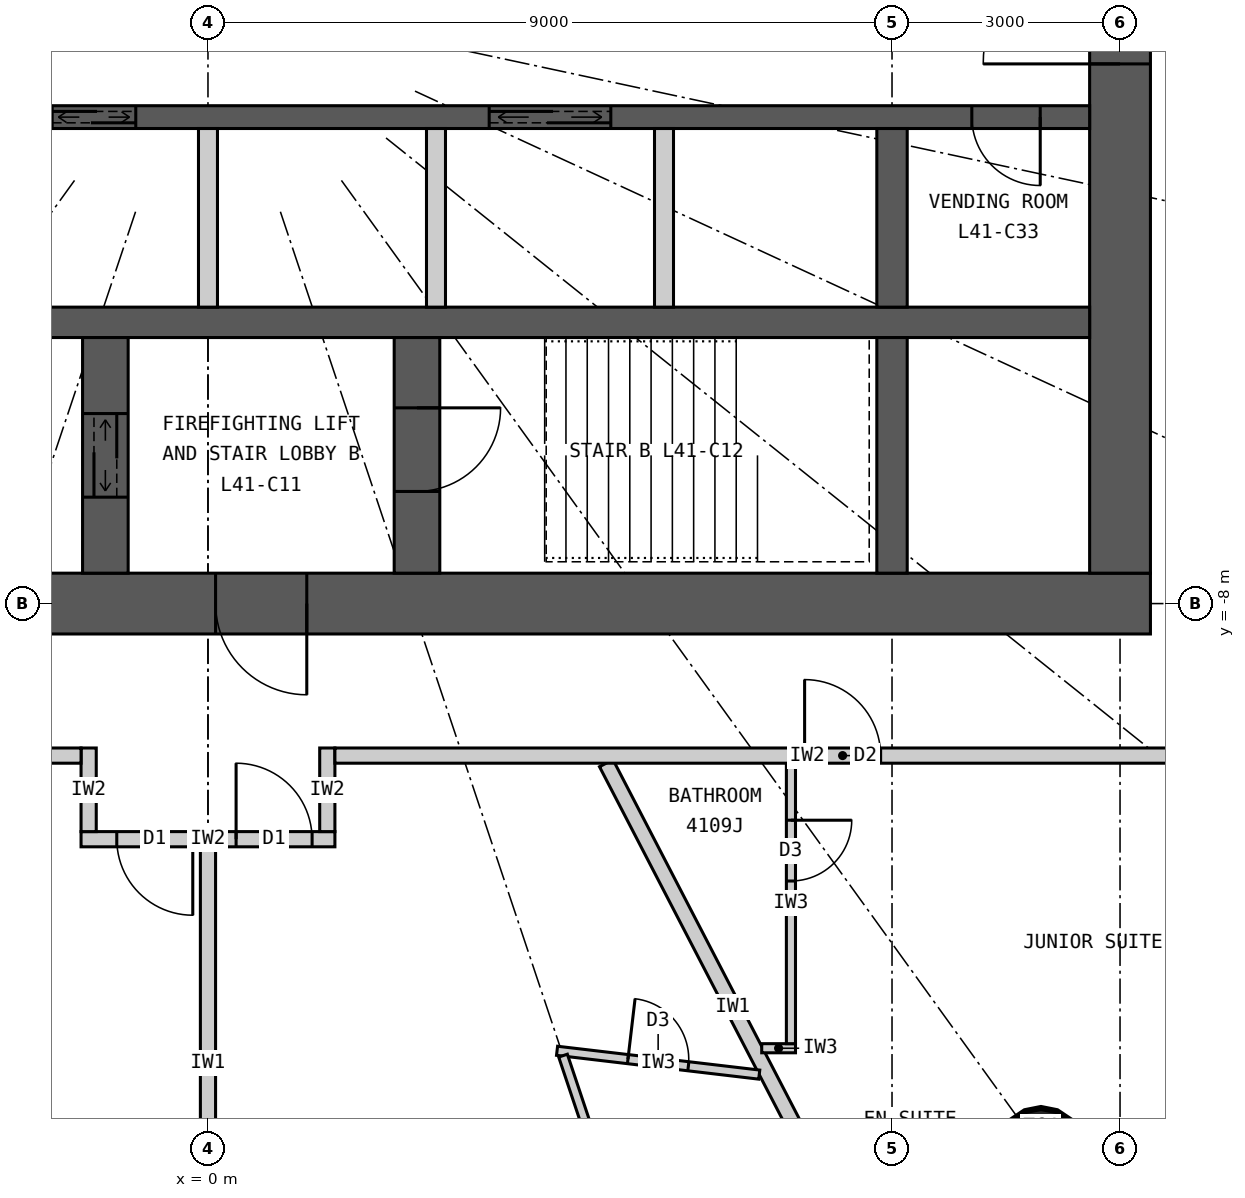
"""IFC4 building model, lengths in metres.
Left out: names, types, materials, properties, quantities, classifications, styles, units other than length and angle.
Written with IfcOpenShell. Run it as: python <this file> out.ifc"""

import sys

from ifc_helpers import new_model, si_unit, direction, frame, frame_2d, origin, origin_2d, place, context, subcontext, project, spatial, rectangle, circle, extrude, element, fill, save


model = new_model("IFC4")
c1 = context("Model", 3, precision=1e-05, world=origin(), true_north=direction((0.0, 1.0)))
c2 = subcontext(c1, "Body", "Model", "MODEL_VIEW")
j1 = project(units=[si_unit("LENGTHUNIT", "METRE"), si_unit("PLANEANGLEUNIT", "RADIAN")], contexts=[c1])
p1 = place(None, origin())
s1 = spatial("IfcSite", under=j1, at=p1, CompositionType="ELEMENT")
p2 = place(p1, origin())
s2 = spatial("IfcBuilding", under=s1, at=p2, CompositionType="ELEMENT")
p3 = place(p2, frame((0.0, 0.0, 156.6)))
s3 = spatial("IfcBuildingStorey", under=s2, at=p3, CompositionType="ELEMENT", Elevation=156.6)
p4 = place(p3, frame((10.96, -15.186, 0.0), z_axis=(0.0, 0.0, 1.0), x_axis=(1.0, 0.0, 0.0)))
e1 = element("IfcColumn", 1, at=p4, inside=s3, PredefinedType="COLUMN", context=c2, shape_type="SweptSolid", body=[
    extrude(circle(Radius=0.55, at=origin_2d()), origin(), (0.0, 0.0, 1.0), 3.3),
])
p5 = place(p3, frame((12.4, -8.0, 0.0), z_axis=(0.0, 0.0, 1.0), x_axis=(-1.0, 0.0, 0.0)))
e2 = element("IfcWall", 2, at=p5, inside=s3, PredefinedType="SHEAR", context=c2, shape_type="SweptSolid", body=[
    extrude(rectangle(XDim=24.8, YDim=0.8, at=frame_2d((12.4, 0.0))), origin(), (0.0, 0.0, 1.0), 3.3),
])
p6 = place(p5, frame((11.1, 0.0, 0.0)))
e3 = element("IfcOpeningElement", 3, at=p6, cuts=e2, PredefinedType="OPENING", context=c2, shape_type="SweptSolid", body=[
    extrude(rectangle(XDim=1.2, YDim=2.2, at=frame_2d((0.6, 1.1))), frame((0.0, 0.41, 0.0), z_axis=(0.0, -1.0, 0.0), x_axis=(1.0, 0.0, 0.0)), (0.0, 0.0, 1.0), 0.82),
])
p7 = place(p5, frame((18.7, 0.0, 0.0)))
e4 = element("IfcOpeningElement", 4, at=p7, cuts=e2, PredefinedType="OPENING", context=c2, shape_type="SweptSolid", body=[
    extrude(rectangle(XDim=0.9, YDim=2.2, at=frame_2d((0.45, 1.1))), frame((0.0, 0.41, 0.0), z_axis=(0.0, -1.0, 0.0), x_axis=(1.0, 0.0, 0.0)), (0.0, 0.0, 1.0), 0.82),
])
p8 = place(p3, frame((12.0, -7.6, 0.0), z_axis=(0.0, 0.0, 1.0), x_axis=(0.0, 1.0, 0.0)))
e5 = element("IfcWall", 5, at=p8, inside=s3, PredefinedType="SHEAR", context=c2, shape_type="SweptSolid", body=[
    extrude(rectangle(XDim=15.2, YDim=0.8, at=frame_2d((7.6, 0.0))), origin(), (0.0, 0.0, 1.0), 3.3),
])
p9 = place(p8, frame((6.7, 0.0, 0.0)))
e6 = element("IfcOpeningElement", 6, at=p9, cuts=e5, PredefinedType="OPENING", context=c2, shape_type="SweptSolid", body=[
    extrude(rectangle(XDim=1.8, YDim=2.2, at=frame_2d((0.9, 1.1))), frame((0.0, 0.41, 0.0), z_axis=(0.0, -1.0, 0.0), x_axis=(1.0, 0.0, 0.0)), (0.0, 0.0, 1.0), 0.82),
])
p10 = place(p3, frame((-11.6, -4.3, 0.0), z_axis=(0.0, 0.0, 1.0), x_axis=(1.0, 0.0, 0.0)))
e7 = element("IfcWall", 7, at=p10, inside=s3, PredefinedType="SHEAR", context=c2, shape_type="SweptSolid", body=[
    extrude(rectangle(XDim=23.2, YDim=0.4, at=frame_2d((11.6, 0.0))), origin(), (0.0, 0.0, 1.0), 3.3),
])
p11 = place(p3, frame((-11.6, -1.6, 0.0), z_axis=(0.0, 0.0, 1.0), x_axis=(1.0, 0.0, 0.0)))
e8 = element("IfcWall", 8, at=p11, inside=s3, PredefinedType="SHEAR", context=c2, shape_type="SweptSolid", body=[
    extrude(rectangle(XDim=23.2, YDim=0.3, at=frame_2d((11.6, 0.0))), origin(), (0.0, 0.0, 1.0), 3.3),
])
p12 = place(p11, frame((9.55, 0.0, 0.0)))
e9 = element("IfcOpeningElement", 9, at=p12, cuts=e8, PredefinedType="OPENING", context=c2, shape_type="SweptSolid", body=[
    extrude(rectangle(XDim=1.1, YDim=2.2, at=frame_2d((0.55, 1.1))), frame((0.0, 0.16, 0.0), z_axis=(0.0, -1.0, 0.0), x_axis=(1.0, 0.0, 0.0)), (0.0, 0.0, 1.0), 0.32),
])
p13 = place(p11, frame((15.3, 0.0, 0.0)))
e10 = element("IfcOpeningElement", 10, at=p13, cuts=e8, PredefinedType="OPENING", context=c2, shape_type="SweptSolid", body=[
    extrude(rectangle(XDim=1.6, YDim=2.4, at=frame_2d((0.8, 1.2))), frame((0.0, 0.16, 0.0), z_axis=(0.0, -1.0, 0.0), x_axis=(1.0, 0.0, 0.0)), (0.0, 0.0, 1.0), 0.32),
])
p14 = place(p11, frame((0.65, 0.0, 0.0)))
e11 = element("IfcOpeningElement", 11, at=p14, cuts=e8, PredefinedType="OPENING", context=c2, shape_type="SweptSolid", body=[
    extrude(rectangle(XDim=0.9, YDim=2.2, at=frame_2d((0.45, 1.1))), frame((0.0, 0.16, 0.0), z_axis=(0.0, -1.0, 0.0), x_axis=(1.0, 0.0, 0.0)), (0.0, 0.0, 1.0), 0.32),
])
p15 = place(p11, frame((5.15, 0.0, 0.0)))
e12 = element("IfcOpeningElement", 12, at=p15, cuts=e8, PredefinedType="OPENING", context=c2, shape_type="SweptSolid", body=[
    extrude(rectangle(XDim=0.9, YDim=2.2, at=frame_2d((0.45, 1.1))), frame((0.0, 0.16, 0.0), z_axis=(0.0, -1.0, 0.0), x_axis=(1.0, 0.0, 0.0)), (0.0, 0.0, 1.0), 0.32),
])
p16 = place(p11, frame((21.65, 0.0, 0.0)))
e13 = element("IfcOpeningElement", 13, at=p16, cuts=e8, PredefinedType="OPENING", context=c2, shape_type="SweptSolid", body=[
    extrude(rectangle(XDim=0.9, YDim=2.2, at=frame_2d((0.45, 1.1))), frame((0.0, 0.16, 0.0), z_axis=(0.0, -1.0, 0.0), x_axis=(1.0, 0.0, 0.0)), (0.0, 0.0, 1.0), 0.32),
])
p17 = place(p3, frame((9.0, -4.1, 0.0), z_axis=(0.0, 0.0, 1.0), x_axis=(0.0, 1.0, 0.0)))
e14 = element("IfcWall", 14, at=p17, inside=s3, PredefinedType="SHEAR", context=c2, shape_type="SweptSolid", body=[
    extrude(rectangle(XDim=2.35, YDim=0.4, at=frame_2d((1.175, 0.0))), origin(), (0.0, 0.0, 1.0), 3.3),
])
p18 = place(p3, frame((9.0, -7.6, 0.0), z_axis=(0.0, 0.0, 1.0), x_axis=(0.0, 1.0, 0.0)))
e15 = element("IfcWall", 15, at=p18, inside=s3, PredefinedType="SHEAR", context=c2, shape_type="SweptSolid", body=[
    extrude(rectangle(XDim=3.1, YDim=0.4, at=frame_2d((1.55, 0.0))), origin(), (0.0, 0.0, 1.0), 3.3),
])
p19 = place(p3, frame((2.75, -7.6, 0.0), z_axis=(0.0, 0.0, 1.0), x_axis=(0.0, 1.0, 0.0)))
e16 = element("IfcWall", 16, at=p19, inside=s3, PredefinedType="SHEAR", context=c2, shape_type="SweptSolid", body=[
    extrude(rectangle(XDim=3.1, YDim=0.6, at=frame_2d((1.55, 0.0))), origin(), (0.0, 0.0, 1.0), 3.3),
])
p20 = place(p19, frame((1.075, 0.0, 0.0)))
e17 = element("IfcOpeningElement", 17, at=p20, cuts=e16, PredefinedType="OPENING", context=c2, shape_type="SweptSolid", body=[
    extrude(rectangle(XDim=1.1, YDim=2.2, at=frame_2d((0.55, 1.1))), frame((0.0, 0.31, 0.0), z_axis=(0.0, -1.0, 0.0), x_axis=(1.0, 0.0, 0.0)), (0.0, 0.0, 1.0), 0.62),
])
p21 = place(p3, frame((-1.35, -7.6, 0.0), z_axis=(0.0, 0.0, 1.0), x_axis=(0.0, 1.0, 0.0)))
e18 = element("IfcWall", 18, at=p21, inside=s3, PredefinedType="SHEAR", context=c2, shape_type="SweptSolid", body=[
    extrude(rectangle(XDim=3.1, YDim=0.6, at=frame_2d((1.55, 0.0))), origin(), (0.0, 0.0, 1.0), 3.3),
])
p22 = place(p21, frame((1.0, 0.0, 0.0)))
e19 = element("IfcOpeningElement", 19, at=p22, cuts=e18, PredefinedType="OPENING", context=c2, shape_type="SweptSolid", body=[
    extrude(rectangle(XDim=1.1, YDim=2.2, at=frame_2d((0.55, 1.1))), frame((0.0, 0.31, 0.0), z_axis=(0.0, -1.0, 0.0), x_axis=(1.0, 0.0, 0.0)), (0.0, 0.0, 1.0), 0.62),
])
for number, where, z_axis, x_axis in (
    (20, (0.0, -4.1, 0.0), (0.0, 0.0, 1.0), (0.0, 1.0, 0.0)),
    (21, (3.0, -4.1, 0.0), (0.0, 0.0, 1.0), (0.0, 1.0, 0.0)),
    (22, (6.0, -4.1, 0.0), (0.0, 0.0, 1.0), (0.0, 1.0, 0.0)),
):
    element("IfcWall", number, at=place(p3, frame(where, z_axis=z_axis, x_axis=x_axis)), inside=s3, PredefinedType="PARTITIONING", context=c2, shape_type="SweptSolid", body=[
        extrude(rectangle(XDim=2.35, YDim=0.25, at=frame_2d((1.175, 0.0))), origin(), (0.0, 0.0, 1.0), 3.3),
    ])
p23 = place(p3, frame((11.346, -15.722, 0.0), z_axis=(0.0, 0.0, 1.0), x_axis=(0.857695199231, 0.514158482587, 0.0)))
e23 = element("IfcWall", 23, at=p23, inside=s3, PredefinedType="ELEMENTEDWALL", context=c2, shape_type="SweptSolid", body=[
    extrude(rectangle(XDim=5.536, YDim=0.15, at=frame_2d((2.768, 0.0))), origin(), (0.0, 0.0, 1.0), 3.12),
])
p24 = place(p23, frame((1.068, 0.0, 0.9)))
e24 = element("IfcOpeningElement", 24, at=p24, cuts=e23, PredefinedType="OPENING", context=c2, shape_type="SweptSolid", body=[
    extrude(rectangle(XDim=1.4, YDim=1.9, at=frame_2d((0.7, 0.95))), frame((0.0, 0.085, 0.0), z_axis=(0.0, -1.0, 0.0), x_axis=(1.0, 0.0, 0.0)), (0.0, 0.0, 1.0), 0.17),
])
p25 = place(p23, frame((3.068, 0.0, 0.9)))
e25 = element("IfcOpeningElement", 25, at=p25, cuts=e23, PredefinedType="OPENING", context=c2, shape_type="SweptSolid", body=[
    extrude(rectangle(XDim=1.4, YDim=1.9, at=frame_2d((0.7, 0.95))), frame((0.0, 0.085, 0.0), z_axis=(0.0, -1.0, 0.0), x_axis=(1.0, 0.0, 0.0)), (0.0, 0.0, 1.0), 0.17),
])
p26 = place(p3, frame((0.0, -11.2, 0.0), z_axis=(0.0, 0.0, 1.0), x_axis=(0.0, -1.0, 0.0)))
e26 = element("IfcWall", 26, at=p26, inside=s3, PredefinedType="PARTITIONING", context=c2, shape_type="SweptSolid", body=[
    extrude(rectangle(XDim=5.7, YDim=0.2, at=frame_2d((2.85, 0.0))), origin(), (0.0, 0.0, 1.0), 2.42),
])
p27 = place(p3, frame((5.24, -10.1, 0.0), z_axis=(0.0, 0.0, 1.0), x_axis=(0.460532965373, -0.887642601391, 0.0)))
e27 = element("IfcWall", 27, at=p27, inside=s3, PredefinedType="PARTITIONING", context=c2, shape_type="SweptSolid", body=[
    extrude(rectangle(XDim=7.231, YDim=0.2, at=frame_2d((3.616, 0.0))), origin(), (0.0, 0.0, 1.0), 3.12),
])
p28 = place(p3, frame((1.67, -11.1, 0.0), z_axis=(0.0, 0.0, 1.0), x_axis=(-1.0, 0.0, 0.0)))
e28 = element("IfcWall", 28, at=p28, inside=s3, PredefinedType="PARTITIONING", context=c2, shape_type="SweptSolid", body=[
    extrude(rectangle(XDim=3.34, YDim=0.2, at=frame_2d((1.67, 0.0))), origin(), (0.0, 0.0, 1.0), 3.12),
])
p29 = place(p28, frame((1.87, 0.0, 0.0)))
e29 = element("IfcOpeningElement", 29, at=p29, cuts=e28, PredefinedType="OPENING", context=c2, shape_type="SweptSolid", body=[
    extrude(rectangle(XDim=1.0, YDim=2.2, at=frame_2d((0.5, 1.1))), frame((0.0, 0.11, 0.0), z_axis=(0.0, -1.0, 0.0), x_axis=(1.0, 0.0, 0.0)), (0.0, 0.0, 1.0), 0.22),
])
p30 = place(p28, frame((0.3, 0.0, 0.0)))
e30 = element("IfcOpeningElement", 30, at=p30, cuts=e28, PredefinedType="OPENING", context=c2, shape_type="SweptSolid", body=[
    extrude(rectangle(XDim=1.0, YDim=2.2, at=frame_2d((0.5, 1.1))), frame((0.0, 0.11, 0.0), z_axis=(0.0, -1.0, 0.0), x_axis=(1.0, 0.0, 0.0)), (0.0, 0.0, 1.0), 0.22),
])
for number, where, z_axis, x_axis in (
    (31, (1.57, -9.9, 0.0), (0.0, 0.0, 1.0), (0.0, -1.0, 0.0)),
    (32, (-1.57, -9.9, 0.0), (0.0, 0.0, 1.0), (0.0, -1.0, 0.0)),
):
    element("IfcWall", number, at=place(p3, frame(where, z_axis=z_axis, x_axis=x_axis)), inside=s3, PredefinedType="PARTITIONING", context=c2, shape_type="SweptSolid", body=[
        extrude(rectangle(XDim=1.1, YDim=0.2, at=frame_2d((0.55, 0.0))), origin(), (0.0, 0.0, 1.0), 3.12),
    ])
p31 = place(p3, frame((7.253, -14.197, 0.0), z_axis=(0.0, 0.0, 1.0), x_axis=(-0.993128188393, 0.117031625725, 0.0)))
e33 = element("IfcWall", 33, at=p31, inside=s3, PredefinedType="PARTITIONING", context=c2, shape_type="SweptSolid", body=[
    extrude(rectangle(XDim=2.678, YDim=0.12, at=frame_2d((1.339, 0.0))), origin(), (0.0, 0.0, 1.0), 3.12),
])
p32 = place(p31, frame((0.939, 0.0, 0.0)))
e34 = element("IfcOpeningElement", 34, at=p32, cuts=e33, PredefinedType="OPENING", context=c2, shape_type="SweptSolid", body=[
    extrude(rectangle(XDim=0.8, YDim=2.1, at=frame_2d((0.4, 1.05))), frame((0.0, 0.07, 0.0), z_axis=(0.0, -1.0, 0.0), x_axis=(1.0, 0.0, 0.0)), (0.0, 0.0, 1.0), 0.14),
])
p33 = place(p3, frame((4.671, -13.948, 0.0), z_axis=(0.0, 0.0, 1.0), x_axis=(0.317669167093, -0.948201613729, 0.0)))
e35 = element("IfcWall", 35, at=p33, inside=s3, PredefinedType="PARTITIONING", context=c2, shape_type="SweptSolid", body=[
    extrude(rectangle(XDim=2.54, YDim=0.12, at=frame_2d((1.27, 0.0))), origin(), (0.0, 0.0, 1.0), 2.42),
])
p34 = place(p3, frame((7.286, -13.85, 0.0), z_axis=(0.0, 0.0, 1.0), x_axis=(1.0, 0.0, 0.0)))
e36 = element("IfcWall", 36, at=p34, inside=s3, PredefinedType="PARTITIONING", context=c2, shape_type="SweptSolid", body=[
    extrude(rectangle(XDim=0.444, YDim=0.12, at=frame_2d((0.222, 0.0))), origin(), (0.0, 0.0, 1.0), 3.12),
])
p35 = place(p3, frame((7.67, -10.1, 0.0), z_axis=(0.0, 0.0, 1.0), x_axis=(0.0, -1.0, 0.0)))
e37 = element("IfcWall", 37, at=p35, inside=s3, PredefinedType="PARTITIONING", context=c2, shape_type="SweptSolid", body=[
    extrude(rectangle(XDim=3.69, YDim=0.12, at=frame_2d((1.845, 0.0))), origin(), (0.0, 0.0, 1.0), 3.12),
])
p36 = place(p35, frame((0.75, 0.0, 0.0)))
e38 = element("IfcOpeningElement", 38, at=p36, cuts=e37, PredefinedType="OPENING", context=c2, shape_type="SweptSolid", body=[
    extrude(rectangle(XDim=0.8, YDim=2.1, at=frame_2d((0.4, 1.05))), frame((0.0, 0.07, 0.0), z_axis=(0.0, -1.0, 0.0), x_axis=(1.0, 0.0, 0.0)), (0.0, 0.0, 1.0), 0.14),
])
p37 = place(p3, frame((14.1, -10.0, 0.0), z_axis=(0.0, 0.0, 1.0), x_axis=(-1.0, 0.0, 0.0)))
e39 = element("IfcWall", 39, at=p37, inside=s3, PredefinedType="PARTITIONING", context=c2, shape_type="SweptSolid", body=[
    extrude(rectangle(XDim=12.43, YDim=0.2, at=frame_2d((6.215, 0.0))), origin(), (0.0, 0.0, 1.0), 3.12),
])
p38 = place(p37, frame((5.25, 0.0, 0.0)))
e40 = element("IfcOpeningElement", 40, at=p38, cuts=e39, PredefinedType="OPENING", context=c2, shape_type="SweptSolid", body=[
    extrude(rectangle(XDim=1.0, YDim=2.2, at=frame_2d((0.5, 1.1))), frame((0.0, 0.11, 0.0), z_axis=(0.0, -1.0, 0.0), x_axis=(1.0, 0.0, 0.0)), (0.0, 0.0, 1.0), 0.22),
])
p39 = place(p3, frame((-1.67, -10.0, 0.0), z_axis=(0.0, 0.0, 1.0), x_axis=(-1.0, 0.0, 0.0)))
e41 = element("IfcWall", 41, at=p39, inside=s3, PredefinedType="PARTITIONING", context=c2, shape_type="SweptSolid", body=[
    extrude(rectangle(XDim=12.43, YDim=0.2, at=frame_2d((6.215, 0.0))), origin(), (0.0, 0.0, 1.0), 3.12),
])
p40 = place(p39, frame((9.655, 0.0, 0.0)))
e42 = element("IfcOpeningElement", 42, at=p40, cuts=e41, PredefinedType="OPENING", context=c2, shape_type="SweptSolid", body=[
    extrude(rectangle(XDim=1.0, YDim=2.2, at=frame_2d((0.5, 1.1))), frame((0.0, 0.11, 0.0), z_axis=(0.0, -1.0, 0.0), x_axis=(1.0, 0.0, 0.0)), (0.0, 0.0, 1.0), 0.22),
])
p41 = place(p24, origin())
e43 = element("IfcWindow", 43, at=p41, inside=s3, PartitioningType="SINGLE_PANEL", PredefinedType="WINDOW", context=c2, shape_type="SweptSolid", body=[
    extrude(rectangle(XDim=1.4, YDim=1.9, at=frame_2d((0.7, 0.95))), frame((0.0, 0.03, 0.0), z_axis=(0.0, -1.0, 0.0), x_axis=(1.0, 0.0, 0.0)), (0.0, 0.0, 1.0), 0.06),
])
fill(e24, e43)
p42 = place(p29, origin())
e44 = element("IfcDoor", 44, at=p42, inside=s3, OperationType="SINGLE_SWING_LEFT", PredefinedType="DOOR", context=c2, shape_type="SweptSolid", body=[
    extrude(rectangle(XDim=1.0, YDim=2.2, at=frame_2d((0.5, 1.1))), frame((0.0, 0.025, 0.0), z_axis=(0.0, -1.0, 0.0), x_axis=(1.0, 0.0, 0.0)), (0.0, 0.0, 1.0), 0.05),
])
fill(e29, e44)
p43 = place(p32, origin())
e45 = element("IfcDoor", 45, at=p43, inside=s3, OperationType="SINGLE_SWING_RIGHT", PredefinedType="DOOR", context=c2, shape_type="SweptSolid", body=[
    extrude(rectangle(XDim=0.8, YDim=2.1, at=frame_2d((0.4, 1.05))), frame((0.0, 0.025, 0.0), z_axis=(0.0, -1.0, 0.0), x_axis=(1.0, 0.0, 0.0)), (0.0, 0.0, 1.0), 0.05),
])
fill(e34, e45)
p44 = place(p30, origin())
e46 = element("IfcDoor", 46, at=p44, inside=s3, OperationType="SINGLE_SWING_RIGHT", PredefinedType="DOOR", context=c2, shape_type="SweptSolid", body=[
    extrude(rectangle(XDim=1.0, YDim=2.2, at=frame_2d((0.5, 1.1))), frame((0.0, 0.025, 0.0), z_axis=(0.0, -1.0, 0.0), x_axis=(1.0, 0.0, 0.0)), (0.0, 0.0, 1.0), 0.05),
])
fill(e30, e46)
p45 = place(p36, origin())
e47 = element("IfcDoor", 47, at=p45, inside=s3, OperationType="SINGLE_SWING_LEFT", PredefinedType="DOOR", context=c2, shape_type="SweptSolid", body=[
    extrude(rectangle(XDim=0.8, YDim=2.1, at=frame_2d((0.4, 1.05))), frame((0.0, 0.025, 0.0), z_axis=(0.0, -1.0, 0.0), x_axis=(1.0, 0.0, 0.0)), (0.0, 0.0, 1.0), 0.05),
])
fill(e38, e47)
p46 = place(p38, origin())
e48 = element("IfcDoor", 48, at=p46, inside=s3, OperationType="SINGLE_SWING_RIGHT", PredefinedType="DOOR", context=c2, shape_type="SweptSolid", body=[
    extrude(rectangle(XDim=1.0, YDim=2.2, at=frame_2d((0.5, 1.1))), frame((0.0, 0.025, 0.0), z_axis=(0.0, -1.0, 0.0), x_axis=(1.0, 0.0, 0.0)), (0.0, 0.0, 1.0), 0.05),
])
fill(e40, e48)
p47 = place(p6, origin())
e49 = element("IfcDoor", 49, at=p47, inside=s3, OperationType="SINGLE_SWING_LEFT", PredefinedType="DOOR", context=c2, shape_type="SweptSolid", body=[
    extrude(rectangle(XDim=1.2, YDim=2.2, at=frame_2d((0.6, 1.1))), frame((0.0, 0.025, 0.0), z_axis=(0.0, -1.0, 0.0), x_axis=(1.0, 0.0, 0.0)), (0.0, 0.0, 1.0), 0.05),
])
fill(e3, e49)
p48 = place(p20, origin())
e50 = element("IfcDoor", 50, at=p48, inside=s3, OperationType="SINGLE_SWING_RIGHT", PredefinedType="DOOR", context=c2, shape_type="SweptSolid", body=[
    extrude(rectangle(XDim=1.1, YDim=2.2, at=frame_2d((0.55, 1.1))), frame((0.0, 0.025, 0.0), z_axis=(0.0, -1.0, 0.0), x_axis=(1.0, 0.0, 0.0)), (0.0, 0.0, 1.0), 0.05),
])
fill(e17, e50)
p49 = place(p22, origin())
e51 = element("IfcDoor", 51, at=p49, inside=s3, OperationType="DOUBLE_DOOR_SLIDING", PredefinedType="DOOR", context=c2, shape_type="SweptSolid", body=[
    extrude(rectangle(XDim=1.1, YDim=2.2, at=frame_2d((0.55, 1.1))), frame((0.0, 0.025, 0.0), z_axis=(0.0, -1.0, 0.0), x_axis=(1.0, 0.0, 0.0)), (0.0, 0.0, 1.0), 0.05),
])
fill(e19, e51)
p50 = place(p12, origin())
e52 = element("IfcDoor", 52, at=p50, inside=s3, OperationType="DOUBLE_DOOR_SLIDING", PredefinedType="DOOR", context=c2, shape_type="SweptSolid", body=[
    extrude(rectangle(XDim=1.1, YDim=2.2, at=frame_2d((0.55, 1.1))), frame((0.0, 0.025, 0.0), z_axis=(0.0, -1.0, 0.0), x_axis=(1.0, 0.0, 0.0)), (0.0, 0.0, 1.0), 0.05),
])
fill(e9, e52)
p51 = place(p13, origin())
e53 = element("IfcDoor", 53, at=p51, inside=s3, OperationType="DOUBLE_DOOR_SLIDING", PredefinedType="DOOR", context=c2, shape_type="SweptSolid", body=[
    extrude(rectangle(XDim=1.6, YDim=2.4, at=frame_2d((0.8, 1.2))), frame((0.0, 0.025, 0.0), z_axis=(0.0, -1.0, 0.0), x_axis=(1.0, 0.0, 0.0)), (0.0, 0.0, 1.0), 0.05),
])
fill(e10, e53)
p52 = place(p16, origin())
e54 = element("IfcDoor", 54, at=p52, inside=s3, OperationType="SINGLE_SWING_RIGHT", PredefinedType="DOOR", context=c2, shape_type="SweptSolid", body=[
    extrude(rectangle(XDim=0.9, YDim=2.2, at=frame_2d((0.45, 1.1))), frame((0.0, 0.025, 0.0), z_axis=(0.0, -1.0, 0.0), x_axis=(1.0, 0.0, 0.0)), (0.0, 0.0, 1.0), 0.05),
])
fill(e13, e54)
p53 = place(p9, origin())
e55 = element("IfcDoor", 55, at=p53, inside=s3, OperationType="DOUBLE_DOOR_DOUBLE_SWING", PredefinedType="DOOR", context=c2, shape_type="SweptSolid", body=[
    extrude(rectangle(XDim=1.8, YDim=2.2, at=frame_2d((0.9, 1.1))), frame((0.0, 0.025, 0.0), z_axis=(0.0, -1.0, 0.0), x_axis=(1.0, 0.0, 0.0)), (0.0, 0.0, 1.0), 0.05),
])
fill(e6, e55)
save(model, sys.argv[1])
